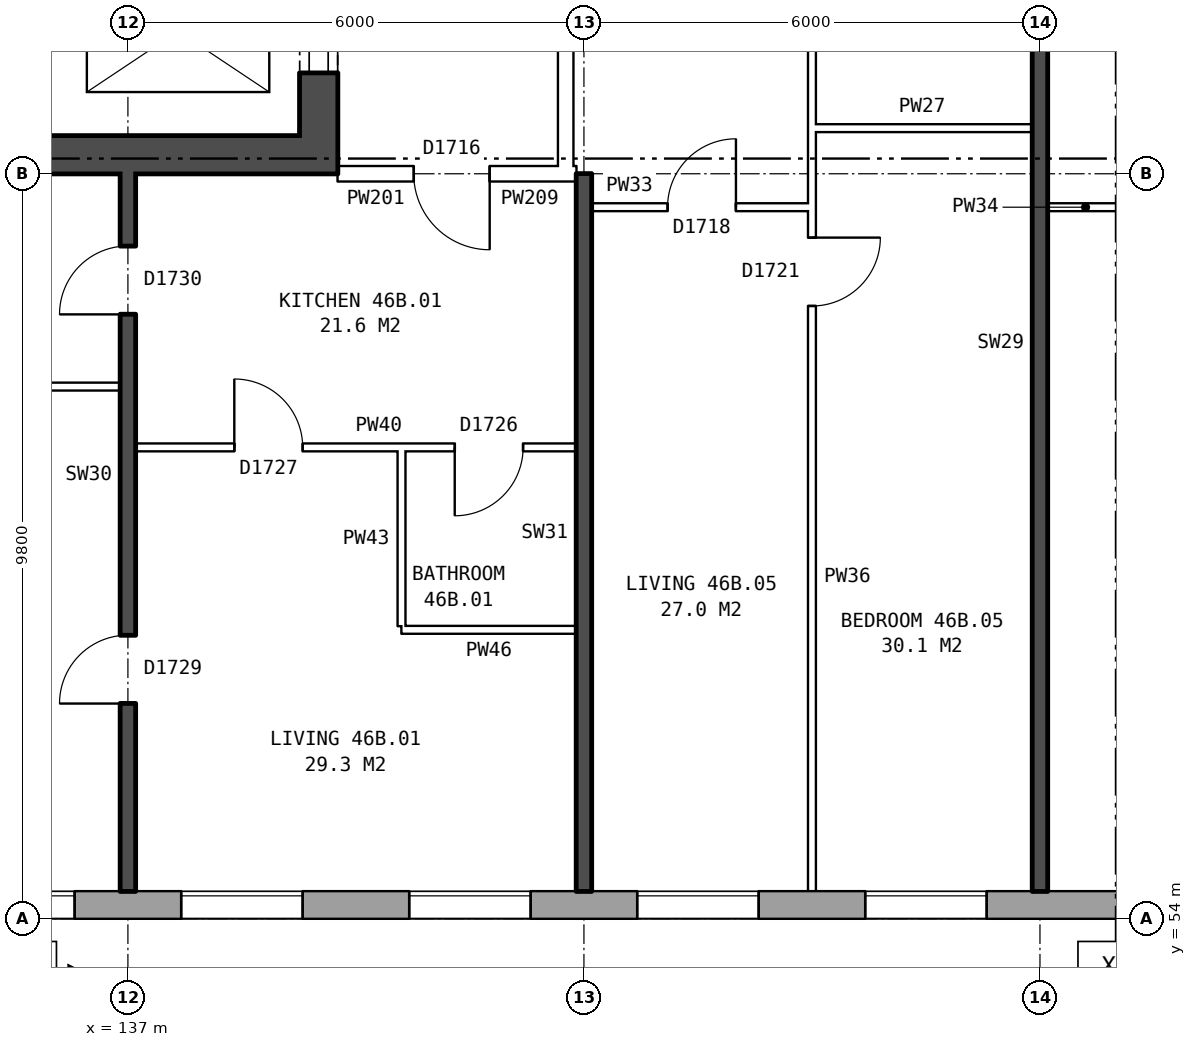
"""IFC4 building model, lengths in metres.
Left out: names, types, materials, properties, quantities, classifications, styles, units other than length and angle.
Written with IfcOpenShell. Run it as: python <this file> out.ifc"""

import sys

from ifc_helpers import new_model, si_unit, direction, frame, frame_2d, origin, place, context, subcontext, project, spatial, rectangle, extrude, element, fill, save


model = new_model("IFC4")
c1 = context("Model", 3, precision=1e-05, world=origin(), true_north=direction((0.0, 1.0)))
c2 = subcontext(c1, "Body", "Model", "MODEL_VIEW")
j1 = project(units=[si_unit("LENGTHUNIT", "METRE"), si_unit("PLANEANGLEUNIT", "RADIAN")], contexts=[c1])
p1 = place(None, origin())
s1 = spatial("IfcSite", under=j1, at=p1, CompositionType="ELEMENT")
p2 = place(p1, origin())
s2 = spatial("IfcBuilding", under=s1, at=p2, CompositionType="ELEMENT")
p3 = place(p2, frame((0.0, 0.0, 164.0)))
s3 = spatial("IfcBuildingStorey", under=s2, at=p3, CompositionType="ELEMENT", Elevation=164.0)
p4 = place(p3, frame((134.075, 54.18, 0.0), z_axis=(0.0, 0.0, 1.0), x_axis=(1.0, 0.0, 0.0)))
e1 = element("IfcWall", 1, at=p4, inside=s3, PredefinedType="STANDARD", context=c2, shape_type="SweptSolid", body=[
    extrude(rectangle(XDim=34.351, YDim=0.36, at=frame_2d((17.175, 0.0))), origin(), (0.0, 0.0, 1.0), 2.85),
])
p5 = place(p4, frame((0.625, 0.0, 0.8)))
e2 = element("IfcOpeningElement", 2, at=p5, cuts=e1, PredefinedType="OPENING", context=c2, shape_type="SweptSolid", body=[
    extrude(rectangle(XDim=1.6, YDim=1.8, at=frame_2d((0.8, 0.9))), frame((0.0, 0.19, 0.0), z_axis=(0.0, -1.0, 0.0), x_axis=(1.0, 0.0, 0.0)), (0.0, 0.0, 1.0), 0.38),
])
p6 = place(p4, frame((3.625, 0.0, 0.8)))
e3 = element("IfcOpeningElement", 3, at=p6, cuts=e1, PredefinedType="OPENING", context=c2, shape_type="SweptSolid", body=[
    extrude(rectangle(XDim=1.6, YDim=1.8, at=frame_2d((0.8, 0.9))), frame((0.0, 0.19, 0.0), z_axis=(0.0, -1.0, 0.0), x_axis=(1.0, 0.0, 0.0)), (0.0, 0.0, 1.0), 0.38),
])
p7 = place(p4, frame((6.625, 0.0, 0.8)))
e4 = element("IfcOpeningElement", 4, at=p7, cuts=e1, PredefinedType="OPENING", context=c2, shape_type="SweptSolid", body=[
    extrude(rectangle(XDim=1.6, YDim=1.8, at=frame_2d((0.8, 0.9))), frame((0.0, 0.19, 0.0), z_axis=(0.0, -1.0, 0.0), x_axis=(1.0, 0.0, 0.0)), (0.0, 0.0, 1.0), 0.38),
])
p8 = place(p4, frame((9.625, 0.0, 0.8)))
e5 = element("IfcOpeningElement", 5, at=p8, cuts=e1, PredefinedType="OPENING", context=c2, shape_type="SweptSolid", body=[
    extrude(rectangle(XDim=1.6, YDim=1.8, at=frame_2d((0.8, 0.9))), frame((0.0, 0.19, 0.0), z_axis=(0.0, -1.0, 0.0), x_axis=(1.0, 0.0, 0.0)), (0.0, 0.0, 1.0), 0.38),
])
p9 = place(p4, frame((12.625, 0.0, 0.8)))
e6 = element("IfcOpeningElement", 6, at=p9, cuts=e1, PredefinedType="OPENING", context=c2, shape_type="SweptSolid", body=[
    extrude(rectangle(XDim=1.6, YDim=1.8, at=frame_2d((0.8, 0.9))), frame((0.0, 0.19, 0.0), z_axis=(0.0, -1.0, 0.0), x_axis=(1.0, 0.0, 0.0)), (0.0, 0.0, 1.0), 0.38),
])
p10 = place(p4, frame((15.975, 0.0, 0.15)))
e7 = element("IfcOpeningElement", 7, at=p10, cuts=e1, PredefinedType="OPENING", context=c2, shape_type="SweptSolid", body=[
    extrude(rectangle(XDim=0.6, YDim=0.9, at=frame_2d((0.3, 0.45))), frame((0.0, 0.19, 0.0), z_axis=(0.0, -1.0, 0.0), x_axis=(1.0, 0.0, 0.0)), (0.0, 0.0, 1.0), 0.38),
])
p11 = place(p4, frame((18.825, 0.0, 1.7)))
e8 = element("IfcOpeningElement", 8, at=p11, cuts=e1, PredefinedType="OPENING", context=c2, shape_type="SweptSolid", body=[
    extrude(rectangle(XDim=0.6, YDim=0.9, at=frame_2d((0.3, 0.45))), frame((0.0, 0.19, 0.0), z_axis=(0.0, -1.0, 0.0), x_axis=(1.0, 0.0, 0.0)), (0.0, 0.0, 1.0), 0.38),
])
p12 = place(p4, frame((21.625, 0.0, 0.8)))
e9 = element("IfcOpeningElement", 9, at=p12, cuts=e1, PredefinedType="OPENING", context=c2, shape_type="SweptSolid", body=[
    extrude(rectangle(XDim=1.6, YDim=1.8, at=frame_2d((0.8, 0.9))), frame((0.0, 0.19, 0.0), z_axis=(0.0, -1.0, 0.0), x_axis=(1.0, 0.0, 0.0)), (0.0, 0.0, 1.0), 0.38),
])
p13 = place(p4, frame((24.625, 0.0, 0.8)))
e10 = element("IfcOpeningElement", 10, at=p13, cuts=e1, PredefinedType="OPENING", context=c2, shape_type="SweptSolid", body=[
    extrude(rectangle(XDim=1.6, YDim=1.8, at=frame_2d((0.8, 0.9))), frame((0.0, 0.19, 0.0), z_axis=(0.0, -1.0, 0.0), x_axis=(1.0, 0.0, 0.0)), (0.0, 0.0, 1.0), 0.38),
])
p14 = place(p4, frame((27.625, 0.0, 0.8)))
e11 = element("IfcOpeningElement", 11, at=p14, cuts=e1, PredefinedType="OPENING", context=c2, shape_type="SweptSolid", body=[
    extrude(rectangle(XDim=1.6, YDim=1.8, at=frame_2d((0.8, 0.9))), frame((0.0, 0.19, 0.0), z_axis=(0.0, -1.0, 0.0), x_axis=(1.0, 0.0, 0.0)), (0.0, 0.0, 1.0), 0.38),
])
p15 = place(p4, frame((30.625, 0.0, 0.8)))
e12 = element("IfcOpeningElement", 12, at=p15, cuts=e1, PredefinedType="OPENING", context=c2, shape_type="SweptSolid", body=[
    extrude(rectangle(XDim=1.6, YDim=1.8, at=frame_2d((0.8, 0.9))), frame((0.0, 0.19, 0.0), z_axis=(0.0, -1.0, 0.0), x_axis=(1.0, 0.0, 0.0)), (0.0, 0.0, 1.0), 0.38),
])
p16 = place(p4, frame((16.875, 0.0, 0.15)))
e13 = element("IfcOpeningElement", 13, at=p16, cuts=e1, PredefinedType="OPENING", context=c2, shape_type="SweptSolid", body=[
    extrude(rectangle(XDim=0.8, YDim=1.5, at=frame_2d((0.4, 0.75))), frame((0.0, 0.19, 0.0), z_axis=(0.0, -1.0, 0.0), x_axis=(1.0, 0.0, 0.0)), (0.0, 0.0, 1.0), 0.38),
])
p17 = place(p4, frame((19.725, 0.0, 0.9)))
e14 = element("IfcOpeningElement", 14, at=p17, cuts=e1, PredefinedType="OPENING", context=c2, shape_type="SweptSolid", body=[
    extrude(rectangle(XDim=1.0, YDim=1.5, at=frame_2d((0.5, 0.75))), frame((0.0, 0.19, 0.0), z_axis=(0.0, -1.0, 0.0), x_axis=(1.0, 0.0, 0.0)), (0.0, 0.0, 1.0), 0.38),
])
p18 = place(p3, frame((139.51, 63.8, 0.0), z_axis=(0.0, 0.0, 1.0), x_axis=(0.0, 1.0, 0.0)))
e15 = element("IfcWall", 15, at=p18, inside=s3, PredefinedType="SHEAR", context=c2, shape_type="SweptSolid", body=[
    extrude(rectangle(XDim=12.4, YDim=0.5, at=frame_2d((6.2, 0.0))), origin(), (0.0, 0.0, 1.0), 2.85),
])
p19 = place(p18, frame((1.325, 0.0, 0.0)))
e16 = element("IfcOpeningElement", 16, at=p19, cuts=e15, PredefinedType="OPENING", context=c2, shape_type="SweptSolid", body=[
    extrude(rectangle(XDim=1.1, YDim=2.1, at=frame_2d((0.55, 1.05))), frame((0.0, 0.26, 0.0), z_axis=(0.0, -1.0, 0.0), x_axis=(1.0, 0.0, 0.0)), (0.0, 0.0, 1.0), 0.52),
])
p20 = place(p18, frame((3.6, 0.0, 0.0)))
e17 = element("IfcOpeningElement", 17, at=p20, cuts=e15, PredefinedType="OPENING", context=c2, shape_type="SweptSolid", body=[
    extrude(rectangle(XDim=1.1, YDim=2.1, at=frame_2d((0.55, 1.05))), frame((0.0, 0.26, 0.0), z_axis=(0.0, -1.0, 0.0), x_axis=(1.0, 0.0, 0.0)), (0.0, 0.0, 1.0), 0.52),
])
p21 = place(p18, frame((5.8, 0.0, 0.0)))
e18 = element("IfcOpeningElement", 18, at=p21, cuts=e15, PredefinedType="OPENING", context=c2, shape_type="SweptSolid", body=[
    extrude(rectangle(XDim=1.1, YDim=2.1, at=frame_2d((0.55, 1.05))), frame((0.0, 0.26, 0.0), z_axis=(0.0, -1.0, 0.0), x_axis=(1.0, 0.0, 0.0)), (0.0, 0.0, 1.0), 0.52),
])
p22 = place(p18, frame((9.9, 0.0, 0.0)))
e19 = element("IfcOpeningElement", 19, at=p22, cuts=e15, PredefinedType="OPENING", context=c2, shape_type="SweptSolid", body=[
    extrude(rectangle(XDim=1.1, YDim=2.1, at=frame_2d((0.55, 1.05))), frame((0.0, 0.26, 0.0), z_axis=(0.0, -1.0, 0.0), x_axis=(1.0, 0.0, 0.0)), (0.0, 0.0, 1.0), 0.52),
])
p23 = place(p18, frame((8.125, 0.0, 0.0)))
e20 = element("IfcOpeningElement", 20, at=p23, cuts=e15, PredefinedType="OPENING", context=c2, shape_type="SweptSolid", body=[
    extrude(rectangle(XDim=0.85, YDim=2.1, at=frame_2d((0.425, 1.05))), frame((0.0, 0.26, 0.0), z_axis=(0.0, -1.0, 0.0), x_axis=(1.0, 0.0, 0.0)), (0.0, 0.0, 1.0), 0.52),
])
p24 = place(p3, frame((139.26, 64.05, 0.0), z_axis=(0.0, 0.0, 1.0), x_axis=(-1.0, 0.0, 0.0)))
e21 = element("IfcWall", 21, at=p24, inside=s3, PredefinedType="SHEAR", context=c2, shape_type="SweptSolid", body=[
    extrude(rectangle(XDim=7.4, YDim=0.5, at=frame_2d((3.7, 0.0))), origin(), (0.0, 0.0, 1.0), 2.85),
])
p25 = place(p3, frame((142.76, 63.9, 0.0), z_axis=(0.0, 0.0, 1.0), x_axis=(0.0, 1.0, 0.0)))
e22 = element("IfcWall", 22, at=p25, inside=s3, PredefinedType="PARTITIONING", context=c2, shape_type="SweptSolid", body=[
    extrude(rectangle(XDim=12.2, YDim=0.2, at=frame_2d((6.1, 0.0))), origin(), (0.0, 0.0, 1.0), 2.85),
])
p26 = place(p25, frame((5.1, 0.0, 0.0)))
e23 = element("IfcOpeningElement", 23, at=p26, cuts=e22, PredefinedType="OPENING", context=c2, shape_type="SweptSolid", body=[
    extrude(rectangle(XDim=2.0, YDim=2.1, at=frame_2d((1.0, 1.05))), frame((0.0, 0.11, 0.0), z_axis=(0.0, -1.0, 0.0), x_axis=(1.0, 0.0, 0.0)), (0.0, 0.0, 1.0), 0.22),
])
p27 = place(p3, frame((140.6, 57.8, 0.0), z_axis=(0.0, 0.0, 1.0), x_axis=(1.0, 0.0, 0.0)))
e24 = element("IfcWall", 24, at=p27, inside=s3, PredefinedType="PARTITIONING", context=c2, shape_type="SweptSolid", body=[
    extrude(rectangle(XDim=2.3, YDim=0.1, at=frame_2d((1.15, 0.0))), origin(), (0.0, 0.0, 1.0), 2.85),
])
p28 = place(p3, frame((137.1, 60.2, 0.0), z_axis=(0.0, 0.0, 1.0), x_axis=(1.0, 0.0, 0.0)))
e25 = element("IfcWall", 25, at=p28, inside=s3, PredefinedType="PARTITIONING", context=c2, shape_type="SweptSolid", body=[
    extrude(rectangle(XDim=5.8, YDim=0.1, at=frame_2d((2.9, 0.0))), origin(), (0.0, 0.0, 1.0), 2.85),
])
p29 = place(p28, frame((1.3, 0.0, 0.0)))
e26 = element("IfcOpeningElement", 26, at=p29, cuts=e25, PredefinedType="OPENING", context=c2, shape_type="SweptSolid", body=[
    extrude(rectangle(XDim=0.9, YDim=2.1, at=frame_2d((0.45, 1.05))), frame((0.0, 0.06, 0.0), z_axis=(0.0, -1.0, 0.0), x_axis=(1.0, 0.0, 0.0)), (0.0, 0.0, 1.0), 0.12),
])
p30 = place(p28, frame((4.2, 0.0, 0.0)))
e27 = element("IfcOpeningElement", 27, at=p30, cuts=e25, PredefinedType="OPENING", context=c2, shape_type="SweptSolid", body=[
    extrude(rectangle(XDim=0.9, YDim=2.1, at=frame_2d((0.45, 1.05))), frame((0.0, 0.06, 0.0), z_axis=(0.0, -1.0, 0.0), x_axis=(1.0, 0.0, 0.0)), (0.0, 0.0, 1.0), 0.12),
])
p31 = place(p3, frame((131.36, 61.0, 0.0), z_axis=(0.0, 0.0, 1.0), x_axis=(1.0, 0.0, 0.0)))
e28 = element("IfcWall", 28, at=p31, inside=s3, PredefinedType="PARTITIONING", context=c2, shape_type="SweptSolid", body=[
    extrude(rectangle(XDim=5.54, YDim=0.1, at=frame_2d((2.77, 0.0))), origin(), (0.0, 0.0, 1.0), 2.85),
])
p32 = place(p3, frame((143.1, 63.36, 0.0), z_axis=(0.0, 0.0, 1.0), x_axis=(1.0, 0.0, 0.0)))
e29 = element("IfcWall", 29, at=p32, inside=s3, PredefinedType="PARTITIONING", context=c2, shape_type="SweptSolid", body=[
    extrude(rectangle(XDim=2.9, YDim=0.1, at=frame_2d((1.45, 0.0))), origin(), (0.0, 0.0, 1.0), 2.85),
])
p33 = place(p32, frame((1.0, 0.0, 0.0)))
e30 = element("IfcOpeningElement", 30, at=p33, cuts=e29, PredefinedType="OPENING", context=c2, shape_type="SweptSolid", body=[
    extrude(rectangle(XDim=0.9, YDim=2.1, at=frame_2d((0.45, 1.05))), frame((0.0, 0.06, 0.0), z_axis=(0.0, -1.0, 0.0), x_axis=(1.0, 0.0, 0.0)), (0.0, 0.0, 1.0), 0.12),
])
p34 = place(p3, frame((149.1, 63.36, 0.0), z_axis=(0.0, 0.0, 1.0), x_axis=(1.0, 0.0, 0.0)))
e31 = element("IfcWall", 31, at=p34, inside=s3, PredefinedType="PARTITIONING", context=c2, shape_type="SweptSolid", body=[
    extrude(rectangle(XDim=2.9, YDim=0.1, at=frame_2d((1.45, 0.0))), origin(), (0.0, 0.0, 1.0), 2.85),
])
p35 = place(p34, frame((1.0, 0.0, 0.0)))
e32 = element("IfcOpeningElement", 32, at=p35, cuts=e31, PredefinedType="OPENING", context=c2, shape_type="SweptSolid", body=[
    extrude(rectangle(XDim=0.9, YDim=2.1, at=frame_2d((0.45, 1.05))), frame((0.0, 0.06, 0.0), z_axis=(0.0, -1.0, 0.0), x_axis=(1.0, 0.0, 0.0)), (0.0, 0.0, 1.0), 0.12),
])
p36 = place(p3, frame((139.76, 63.8, 0.0), z_axis=(0.0, 0.0, 1.0), x_axis=(1.0, 0.0, 0.0)))
e33 = element("IfcWall", 33, at=p36, inside=s3, PredefinedType="PARTITIONING", context=c2, shape_type="SweptSolid", body=[
    extrude(rectangle(XDim=3.0, YDim=0.2, at=frame_2d((1.5, 0.0))), origin(), (0.0, 0.0, 1.0), 2.85),
])
p37 = place(p36, frame((1.0, 0.0, 0.0)))
e34 = element("IfcOpeningElement", 34, at=p37, cuts=e33, PredefinedType="OPENING", context=c2, shape_type="SweptSolid", body=[
    extrude(rectangle(XDim=1.0, YDim=2.1, at=frame_2d((0.5, 1.05))), frame((0.0, 0.11, 0.0), z_axis=(0.0, -1.0, 0.0), x_axis=(1.0, 0.0, 0.0)), (0.0, 0.0, 1.0), 0.22),
])
p38 = place(p3, frame((142.76, 63.8, 0.0), z_axis=(0.0, 0.0, 1.0), x_axis=(1.0, 0.0, 0.0)))
e35 = element("IfcWall", 35, at=p38, inside=s3, PredefinedType="PARTITIONING", context=c2, shape_type="SweptSolid", body=[
    extrude(rectangle(XDim=0.14, YDim=0.2, at=frame_2d((0.07, 0.0))), origin(), (0.0, 0.0, 1.0), 2.85),
])
p39 = place(p3, frame((146.0, 64.4, 0.0), z_axis=(0.0, 0.0, 1.0), x_axis=(1.0, 0.0, 0.0)))
e36 = element("IfcWall", 36, at=p39, inside=s3, PredefinedType="PARTITIONING", context=c2, shape_type="SweptSolid", body=[
    extrude(rectangle(XDim=2.9, YDim=0.1, at=frame_2d((1.45, 0.0))), origin(), (0.0, 0.0, 1.0), 2.85),
])
p40 = place(p3, frame((137.0, 54.36, 0.0), z_axis=(0.0, 0.0, 1.0), x_axis=(0.0, 1.0, 0.0)))
e37 = element("IfcWall", 37, at=p40, inside=s3, PredefinedType="SOLIDWALL", context=c2, shape_type="SweptSolid", body=[
    extrude(rectangle(XDim=9.44, YDim=0.2, at=frame_2d((4.72, 0.0))), origin(), (0.0, 0.0, 1.0), 2.85),
])
p41 = place(p40, frame((2.47, 0.0, 0.0)))
e38 = element("IfcOpeningElement", 38, at=p41, cuts=e37, PredefinedType="OPENING", context=c2, shape_type="SweptSolid", body=[
    extrude(rectangle(XDim=0.9, YDim=2.1, at=frame_2d((0.45, 1.05))), frame((0.0, 0.11, 0.0), z_axis=(0.0, -1.0, 0.0), x_axis=(1.0, 0.0, 0.0)), (0.0, 0.0, 1.0), 0.22),
])
p42 = place(p40, frame((7.59, 0.0, 0.0)))
e39 = element("IfcOpeningElement", 39, at=p42, cuts=e37, PredefinedType="OPENING", context=c2, shape_type="SweptSolid", body=[
    extrude(rectangle(XDim=0.9, YDim=2.1, at=frame_2d((0.45, 1.05))), frame((0.0, 0.11, 0.0), z_axis=(0.0, -1.0, 0.0), x_axis=(1.0, 0.0, 0.0)), (0.0, 0.0, 1.0), 0.22),
])
p43 = place(p3, frame((140.6, 57.85, 0.0), z_axis=(0.0, 0.0, 1.0), x_axis=(0.0, 1.0, 0.0)))
e40 = element("IfcWall", 40, at=p43, inside=s3, PredefinedType="PARTITIONING", context=c2, shape_type="SweptSolid", body=[
    extrude(rectangle(XDim=2.3, YDim=0.1, at=frame_2d((1.15, 0.0))), origin(), (0.0, 0.0, 1.0), 2.85),
])
p44 = place(p3, frame((143.0, 54.36, 0.0), z_axis=(0.0, 0.0, 1.0), x_axis=(0.0, 1.0, 0.0)))
e41 = element("IfcWall", 41, at=p44, inside=s3, PredefinedType="SOLIDWALL", context=c2, shape_type="SweptSolid", body=[
    extrude(rectangle(XDim=9.44, YDim=0.2, at=frame_2d((4.72, 0.0))), origin(), (0.0, 0.0, 1.0), 2.85),
])
p45 = place(p3, frame((146.0, 54.36, 0.0), z_axis=(0.0, 0.0, 1.0), x_axis=(0.0, 1.0, 0.0)))
e42 = element("IfcWall", 42, at=p45, inside=s3, PredefinedType="PARTITIONING", context=c2, shape_type="SweptSolid", body=[
    extrude(rectangle(XDim=14.34, YDim=0.1, at=frame_2d((7.17, 0.0))), origin(), (0.0, 0.0, 1.0), 2.85),
])
p46 = place(p45, frame((7.7, 0.0, 0.0)))
e43 = element("IfcOpeningElement", 43, at=p46, cuts=e42, PredefinedType="OPENING", context=c2, shape_type="SweptSolid", body=[
    extrude(rectangle(XDim=0.9, YDim=2.1, at=frame_2d((0.45, 1.05))), frame((0.0, 0.06, 0.0), z_axis=(0.0, -1.0, 0.0), x_axis=(1.0, 0.0, 0.0)), (0.0, 0.0, 1.0), 0.12),
])
p47 = place(p45, frame((13.04, 0.0, 0.0)))
e44 = element("IfcOpeningElement", 44, at=p47, cuts=e42, PredefinedType="OPENING", context=c2, shape_type="SweptSolid", body=[
    extrude(rectangle(XDim=0.9, YDim=2.1, at=frame_2d((0.45, 1.05))), frame((0.0, 0.06, 0.0), z_axis=(0.0, -1.0, 0.0), x_axis=(1.0, 0.0, 0.0)), (0.0, 0.0, 1.0), 0.12),
])
p48 = place(p3, frame((149.0, 54.36, 0.0), z_axis=(0.0, 0.0, 1.0), x_axis=(0.0, 1.0, 0.0)))
e45 = element("IfcWall", 45, at=p48, inside=s3, PredefinedType="SOLIDWALL", context=c2, shape_type="SweptSolid", body=[
    extrude(rectangle(XDim=14.44, YDim=0.2, at=frame_2d((7.22, 0.0))), origin(), (0.0, 0.0, 1.0), 2.85),
])
p49 = place(p5, origin())
e46 = element("IfcWindow", 46, at=p49, inside=s3, PartitioningType="SINGLE_PANEL", PredefinedType="WINDOW", context=c2, shape_type="SweptSolid", body=[
    extrude(rectangle(XDim=1.6, YDim=1.8, at=frame_2d((0.8, 0.9))), frame((0.0, 0.15, 0.0), z_axis=(0.0, -1.0, 0.0), x_axis=(1.0, 0.0, 0.0)), (0.0, 0.0, 1.0), 0.06),
])
fill(e2, e46)
p50 = place(p6, origin())
e47 = element("IfcWindow", 47, at=p50, inside=s3, PartitioningType="SINGLE_PANEL", PredefinedType="WINDOW", context=c2, shape_type="SweptSolid", body=[
    extrude(rectangle(XDim=1.6, YDim=1.8, at=frame_2d((0.8, 0.9))), frame((0.0, 0.15, 0.0), z_axis=(0.0, -1.0, 0.0), x_axis=(1.0, 0.0, 0.0)), (0.0, 0.0, 1.0), 0.06),
])
fill(e3, e47)
p51 = place(p7, origin())
e48 = element("IfcWindow", 48, at=p51, inside=s3, PartitioningType="SINGLE_PANEL", PredefinedType="WINDOW", context=c2, shape_type="SweptSolid", body=[
    extrude(rectangle(XDim=1.6, YDim=1.8, at=frame_2d((0.8, 0.9))), frame((0.0, 0.15, 0.0), z_axis=(0.0, -1.0, 0.0), x_axis=(1.0, 0.0, 0.0)), (0.0, 0.0, 1.0), 0.06),
])
fill(e4, e48)
p52 = place(p8, origin())
e49 = element("IfcWindow", 49, at=p52, inside=s3, PartitioningType="SINGLE_PANEL", PredefinedType="WINDOW", context=c2, shape_type="SweptSolid", body=[
    extrude(rectangle(XDim=1.6, YDim=1.8, at=frame_2d((0.8, 0.9))), frame((0.0, 0.15, 0.0), z_axis=(0.0, -1.0, 0.0), x_axis=(1.0, 0.0, 0.0)), (0.0, 0.0, 1.0), 0.06),
])
fill(e5, e49)
p53 = place(p9, origin())
e50 = element("IfcWindow", 50, at=p53, inside=s3, PartitioningType="SINGLE_PANEL", PredefinedType="WINDOW", context=c2, shape_type="SweptSolid", body=[
    extrude(rectangle(XDim=1.6, YDim=1.8, at=frame_2d((0.8, 0.9))), frame((0.0, 0.15, 0.0), z_axis=(0.0, -1.0, 0.0), x_axis=(1.0, 0.0, 0.0)), (0.0, 0.0, 1.0), 0.06),
])
fill(e6, e50)
p54 = place(p19, origin())
e51 = element("IfcDoor", 51, at=p54, inside=s3, OperationType="DOUBLE_DOOR_SLIDING", PredefinedType="DOOR", context=c2, shape_type="SweptSolid", body=[
    extrude(rectangle(XDim=1.1, YDim=2.1, at=frame_2d((0.55, 1.05))), frame((0.0, 0.235, 0.0), z_axis=(0.0, -1.0, 0.0), x_axis=(1.0, 0.0, 0.0)), (0.0, 0.0, 1.0), 0.05),
])
fill(e16, e51)
p55 = place(p41, origin())
e52 = element("IfcDoor", 52, at=p55, inside=s3, OperationType="SINGLE_SWING_LEFT", PredefinedType="DOOR", context=c2, shape_type="SweptSolid", body=[
    extrude(rectangle(XDim=0.9, YDim=2.1, at=frame_2d((0.45, 1.05))), frame((0.0, 0.025, 0.0), z_axis=(0.0, -1.0, 0.0), x_axis=(1.0, 0.0, 0.0)), (0.0, 0.0, 1.0), 0.05),
])
fill(e38, e52)
p56 = place(p42, origin())
e53 = element("IfcDoor", 53, at=p56, inside=s3, OperationType="SINGLE_SWING_LEFT", PredefinedType="DOOR", context=c2, shape_type="SweptSolid", body=[
    extrude(rectangle(XDim=0.9, YDim=2.1, at=frame_2d((0.45, 1.05))), frame((0.0, 0.025, 0.0), z_axis=(0.0, -1.0, 0.0), x_axis=(1.0, 0.0, 0.0)), (0.0, 0.0, 1.0), 0.05),
])
fill(e39, e53)
p57 = place(p37, frame((1.0, 0.0, 0.0), z_axis=(0.0, 0.0, 1.0), x_axis=(-1.0, 0.0, 0.0)))
e54 = element("IfcDoor", 54, at=p57, inside=s3, OperationType="SINGLE_SWING_LEFT", PredefinedType="DOOR", context=c2, shape_type="SweptSolid", body=[
    extrude(rectangle(XDim=1.0, YDim=2.1, at=frame_2d((0.5, 1.05))), frame((0.0, 0.025, 0.0), z_axis=(0.0, -1.0, 0.0), x_axis=(1.0, 0.0, 0.0)), (0.0, 0.0, 1.0), 0.05),
])
fill(e34, e54)
p58 = place(p29, origin())
e55 = element("IfcDoor", 55, at=p58, inside=s3, OperationType="SINGLE_SWING_LEFT", PredefinedType="DOOR", context=c2, shape_type="SweptSolid", body=[
    extrude(rectangle(XDim=0.9, YDim=2.1, at=frame_2d((0.45, 1.05))), frame((0.0, 0.025, 0.0), z_axis=(0.0, -1.0, 0.0), x_axis=(1.0, 0.0, 0.0)), (0.0, 0.0, 1.0), 0.05),
])
fill(e26, e55)
p59 = place(p30, frame((0.9, 0.0, 0.0), z_axis=(0.0, 0.0, 1.0), x_axis=(-1.0, 0.0, 0.0)))
e56 = element("IfcDoor", 56, at=p59, inside=s3, OperationType="SINGLE_SWING_RIGHT", PredefinedType="DOOR", context=c2, shape_type="SweptSolid", body=[
    extrude(rectangle(XDim=0.9, YDim=2.1, at=frame_2d((0.45, 1.05))), frame((0.0, 0.025, 0.0), z_axis=(0.0, -1.0, 0.0), x_axis=(1.0, 0.0, 0.0)), (0.0, 0.0, 1.0), 0.05),
])
fill(e27, e56)
p60 = place(p46, frame((0.9, 0.0, 0.0), z_axis=(0.0, 0.0, 1.0), x_axis=(-1.0, 0.0, 0.0)))
e57 = element("IfcDoor", 57, at=p60, inside=s3, OperationType="SINGLE_SWING_LEFT", PredefinedType="DOOR", context=c2, shape_type="SweptSolid", body=[
    extrude(rectangle(XDim=0.9, YDim=2.1, at=frame_2d((0.45, 1.05))), frame((0.0, 0.025, 0.0), z_axis=(0.0, -1.0, 0.0), x_axis=(1.0, 0.0, 0.0)), (0.0, 0.0, 1.0), 0.05),
])
fill(e43, e57)
p61 = place(p33, origin())
e58 = element("IfcDoor", 58, at=p61, inside=s3, OperationType="SINGLE_SWING_RIGHT", PredefinedType="DOOR", context=c2, shape_type="SweptSolid", body=[
    extrude(rectangle(XDim=0.9, YDim=2.1, at=frame_2d((0.45, 1.05))), frame((0.0, 0.025, 0.0), z_axis=(0.0, -1.0, 0.0), x_axis=(1.0, 0.0, 0.0)), (0.0, 0.0, 1.0), 0.05),
])
fill(e30, e58)
save(model, sys.argv[1])
